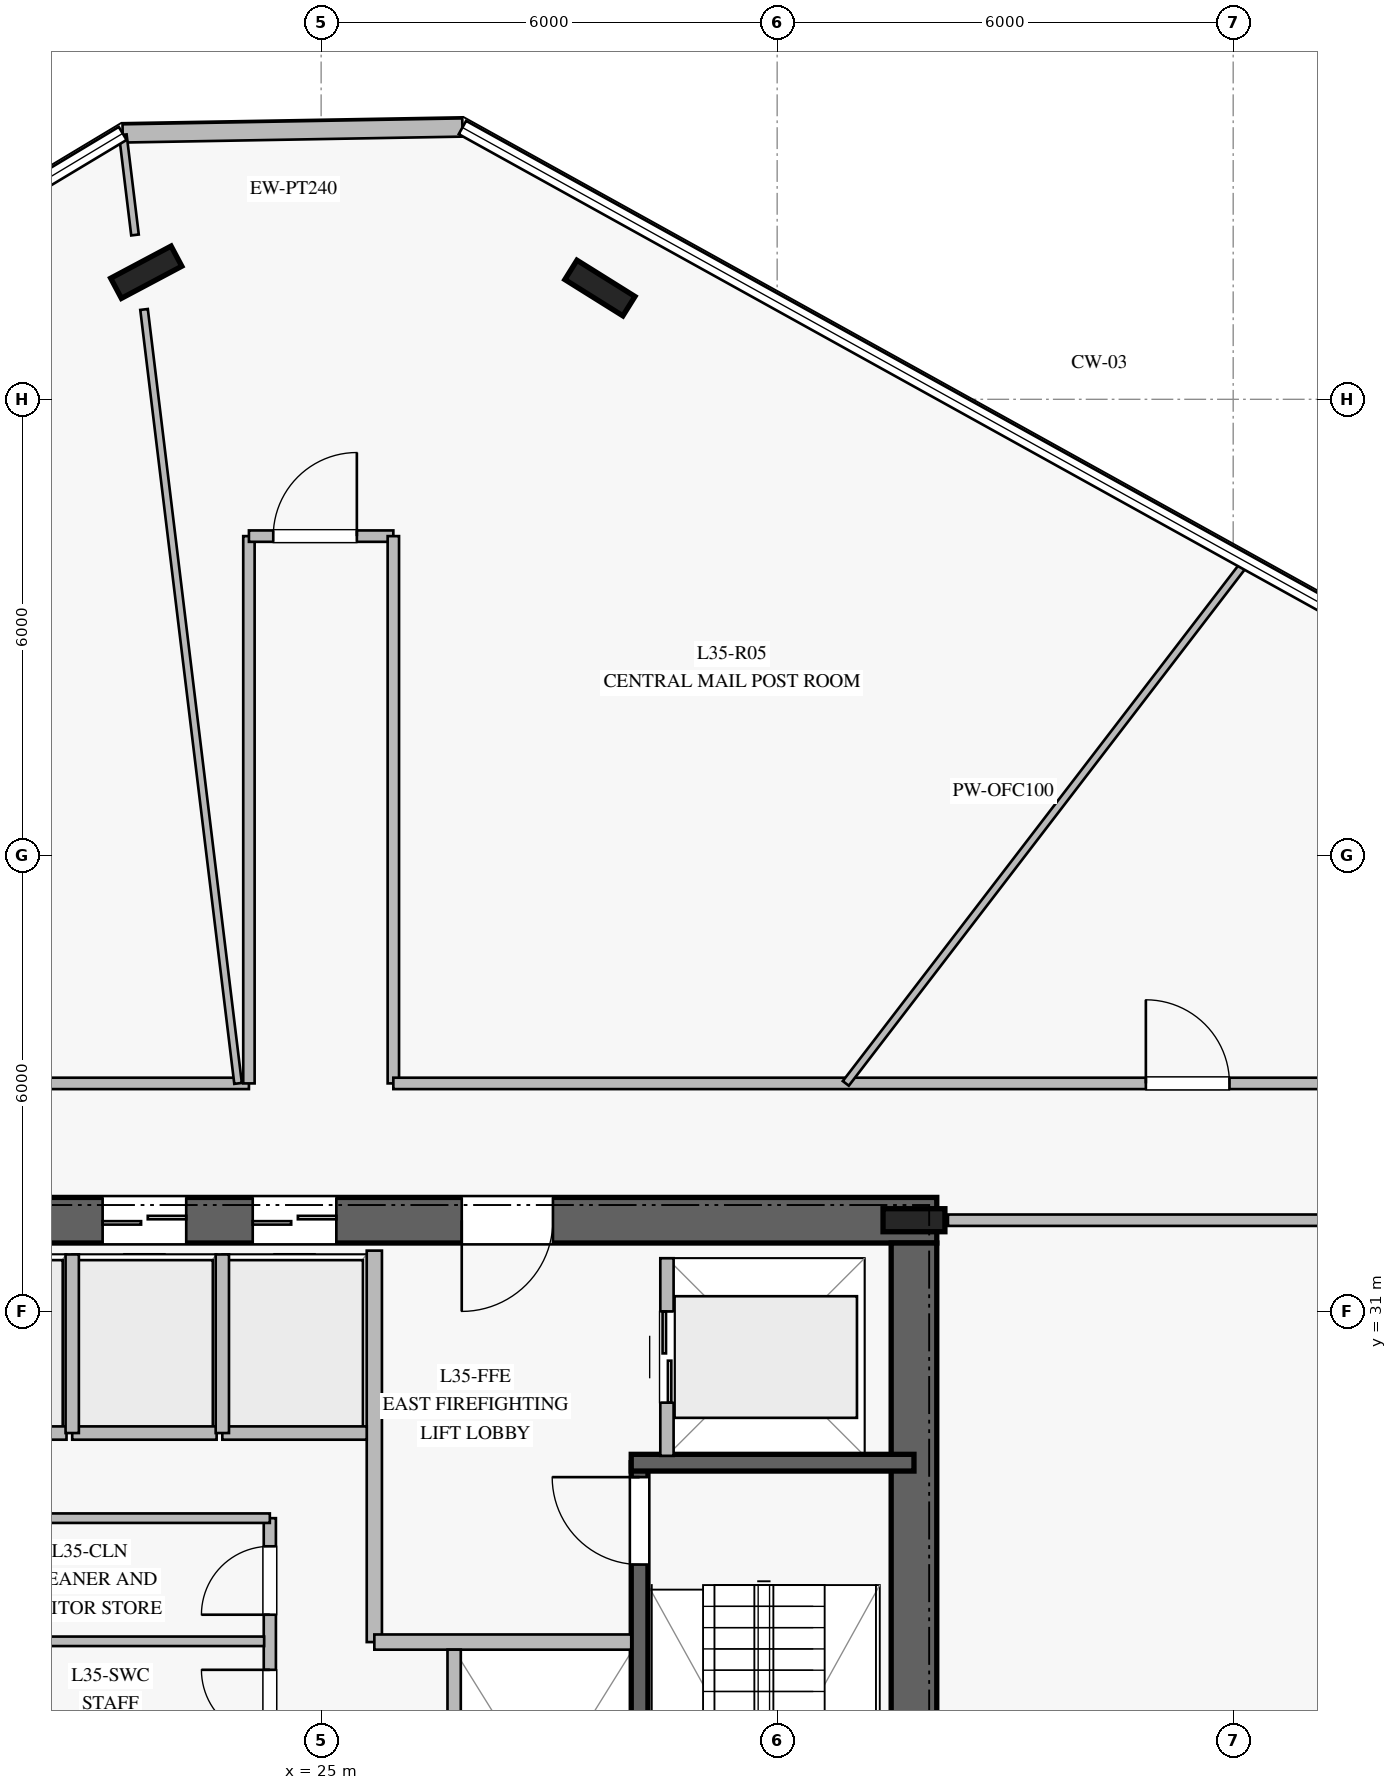
"""IFC4 building model, lengths in metres.
Left out: names, types, materials, properties, quantities, classifications, styles, units other than length and angle.
Written with IfcOpenShell. Run it as: python <this file> out.ifc"""

import sys

from ifc_helpers import new_model, si_unit, direction, frame, frame_2d, origin, origin_2d, place, context, subcontext, project, spatial, rectangle, i_section, extrude, element, fill, save


model = new_model("IFC4")
c1 = context("Model", 3, precision=1e-05, world=origin(), true_north=direction((0.0, 1.0)))
c2 = subcontext(c1, "Body", "Model", "MODEL_VIEW")
j1 = project(units=[si_unit("LENGTHUNIT", "METRE"), si_unit("PLANEANGLEUNIT", "RADIAN")], contexts=[c1])
p1 = place(None, origin())
s1 = spatial("IfcSite", under=j1, at=p1, CompositionType="ELEMENT")
p2 = place(p1, origin())
s2 = spatial("IfcBuilding", under=s1, at=p2, CompositionType="ELEMENT")
p3 = place(p2, frame((0.0, 0.0, 146.4)))
s3 = spatial("IfcBuildingStorey", under=s2, at=p3, CompositionType="ELEMENT", Elevation=146.4)
p4 = place(p3, frame((33.1, 32.2, 0.0), z_axis=(0.0, 0.0, 1.0), x_axis=(-1.0, 0.0, 0.0)))
e1 = element("IfcWall", 1, at=p4, inside=s3, PredefinedType="SHEAR", context=c2, shape_type="SweptSolid", body=[
    extrude(rectangle(XDim=16.2, YDim=0.6, at=frame_2d((8.1, 0.0))), origin(), (0.0, 0.0, 1.0), 3.76),
])
p5 = place(p4, frame((5.05, 0.0, 0.0)))
e2 = element("IfcOpeningElement", 2, at=p5, cuts=e1, PredefinedType="OPENING", context=c2, shape_type="SweptSolid", body=[
    extrude(rectangle(XDim=1.2, YDim=2.25, at=frame_2d((0.6, 1.125))), frame((0.0, 0.31, 0.0), z_axis=(0.0, -1.0, 0.0), x_axis=(1.0, 0.0, 0.0)), (0.0, 0.0, 1.0), 0.62),
])
p6 = place(p4, frame((11.85, 0.0, 0.0)))
e3 = element("IfcOpeningElement", 3, at=p6, cuts=e1, PredefinedType="OPENING", context=c2, shape_type="SweptSolid", body=[
    extrude(rectangle(XDim=1.1, YDim=2.2, at=frame_2d((0.55, 1.1))), frame((0.0, 0.31, 0.0), z_axis=(0.0, -1.0, 0.0), x_axis=(1.0, 0.0, 0.0)), (0.0, 0.0, 1.0), 0.62),
])
p7 = place(p4, frame((9.875, 0.0, 0.0)))
e4 = element("IfcOpeningElement", 4, at=p7, cuts=e1, PredefinedType="OPENING", context=c2, shape_type="SweptSolid", body=[
    extrude(rectangle(XDim=1.1, YDim=2.2, at=frame_2d((0.55, 1.1))), frame((0.0, 0.31, 0.0), z_axis=(0.0, -1.0, 0.0), x_axis=(1.0, 0.0, 0.0)), (0.0, 0.0, 1.0), 0.62),
])
p8 = place(p4, frame((7.9, 0.0, 0.0)))
e5 = element("IfcOpeningElement", 5, at=p8, cuts=e1, PredefinedType="OPENING", context=c2, shape_type="SweptSolid", body=[
    extrude(rectangle(XDim=1.1, YDim=2.2, at=frame_2d((0.55, 1.1))), frame((0.0, 0.31, 0.0), z_axis=(0.0, -1.0, 0.0), x_axis=(1.0, 0.0, 0.0)), (0.0, 0.0, 1.0), 0.62),
])
p9 = place(p3, frame((32.8, 18.1, 0.0), z_axis=(0.0, 0.0, 1.0), x_axis=(0.0, 1.0, 0.0)))
e6 = element("IfcWall", 6, at=p9, inside=s3, PredefinedType="SHEAR", context=c2, shape_type="SweptSolid", body=[
    extrude(rectangle(XDim=13.8, YDim=0.6, at=frame_2d((6.9, 0.0))), origin(), (0.0, 0.0, 1.0), 3.76),
])
p10 = place(p3, frame((32.8, 32.2, 0.0), z_axis=(0.0, 0.0, 1.0), x_axis=(1.0, 0.0, 0.0)))
e7 = element("IfcColumn", 7, at=p10, inside=s3, PredefinedType="COLUMN", context=c2, shape_type="SweptSolid", body=[
    extrude(i_section(OverallWidth=0.303, OverallDepth=0.814, WebThickness=0.021, FlangeThickness=0.04, at=origin_2d()), origin(), (0.0, 0.0, 1.0), 4.0),
])
p11 = place(p3, frame((29.19, 21.79, 0.0), z_axis=(0.0, 0.0, 1.0), x_axis=(0.0, 1.0, 0.0)))
e8 = element("IfcWall", 8, at=p11, inside=s3, PredefinedType="SOLIDWALL", context=c2, shape_type="SweptSolid", body=[
    extrude(rectangle(XDim=7.22, YDim=0.22, at=frame_2d((3.61, 0.0))), origin(), (0.0, 0.0, 1.0), 3.76),
])
p12 = place(p11, frame((5.88, 0.0, 0.0)))
e9 = element("IfcOpeningElement", 9, at=p12, cuts=e8, PredefinedType="OPENING", context=c2, shape_type="SweptSolid", body=[
    extrude(rectangle(XDim=1.15, YDim=2.2, at=frame_2d((0.575, 1.1))), frame((0.0, 0.12, 0.0), z_axis=(0.0, -1.0, 0.0), x_axis=(1.0, 0.0, 0.0)), (0.0, 0.0, 1.0), 0.24),
])
p13 = place(p3, frame((29.08, 29.01, 0.0), z_axis=(0.0, 0.0, 1.0), x_axis=(1.0, 0.0, 0.0)))
e10 = element("IfcWall", 10, at=p13, inside=s3, PredefinedType="SOLIDWALL", context=c2, shape_type="SweptSolid", body=[
    extrude(rectangle(XDim=3.72, YDim=0.22, at=frame_2d((1.86, 0.0))), origin(), (0.0, 0.0, 1.0), 3.76),
])
for number, where, z_axis, x_axis in (
    (11, (28.668, 44.464, 0.0), (0.0, 0.0, 1.0), (-0.848, 0.53, 0.0)),
    (12, (22.699, 44.672, 0.0), (0.0, 0.0, 1.0), (0.883, 0.469, 0.0)),
):
    element("IfcColumn", number, at=place(p3, frame(where, z_axis=z_axis, x_axis=x_axis)), inside=s3, PredefinedType="COLUMN", context=c2, shape_type="SweptSolid", body=[
        extrude(i_section(OverallWidth=0.3, OverallDepth=0.9, WebThickness=0.019, FlangeThickness=0.035, at=origin_2d()), origin(), (0.0, 0.0, 1.0), 4.0),
    ])
p14 = place(p3, frame((26.859, 46.576, 0.0), z_axis=(0.0, 0.0, 1.0), x_axis=(-0.999848251902, -0.017420481313, 0.0)))
e13 = element("IfcWall", 13, at=p14, inside=s3, PredefinedType="STANDARD", context=c2, shape_type="SweptSolid", body=[
    extrude(rectangle(XDim=4.471, YDim=0.24, at=frame_2d((2.235, 0.0))), origin(), (0.0, 0.0, 1.0), 3.76),
])
p15 = place(p3, frame((25.7, 26.65, 0.0), z_axis=(0.0, 0.0, 1.0), x_axis=(0.0, 1.0, 0.0)))
e14 = element("IfcWall", 14, at=p15, inside=s3, PredefinedType="PARTITIONING", context=c2, shape_type="SweptSolid", body=[
    extrude(rectangle(XDim=5.15, YDim=0.2, at=frame_2d((2.575, 0.0))), origin(), (0.0, 0.0, 1.0), 3.76),
])
p16 = place(p3, frame((25.7, 26.65, 0.0), z_axis=(0.0, 0.0, 1.0), x_axis=(1.0, 0.0, 0.0)))
e15 = element("IfcWall", 15, at=p16, inside=s3, PredefinedType="PARTITIONING", context=c2, shape_type="SweptSolid", body=[
    extrude(rectangle(XDim=3.38, YDim=0.2, at=frame_2d((1.69, 0.0))), origin(), (0.0, 0.0, 1.0), 3.76),
])
p17 = place(p3, frame((24.325, 23.35, 0.0), z_axis=(0.0, 0.0, 1.0), x_axis=(0.0, 1.0, 0.0)))
e16 = element("IfcWall", 16, at=p17, inside=s3, PredefinedType="PLUMBINGWALL", context=c2, shape_type="SweptSolid", body=[
    extrude(rectangle(XDim=4.93, YDim=0.16, at=frame_2d((2.465, 0.0))), origin(), (0.0, 0.0, 1.0), 3.76),
])
p18 = place(p17, frame((0.375, 0.0, 0.0)))
e17 = element("IfcOpeningElement", 17, at=p18, cuts=e16, PredefinedType="OPENING", context=c2, shape_type="SweptSolid", body=[
    extrude(rectangle(XDim=0.95, YDim=2.1, at=frame_2d((0.475, 1.05))), frame((0.0, 0.09, 0.0), z_axis=(0.0, -1.0, 0.0), x_axis=(1.0, 0.0, 0.0)), (0.0, 0.0, 1.0), 0.18),
])
p19 = place(p17, frame((2.035, 0.0, 0.0)))
e18 = element("IfcOpeningElement", 18, at=p19, cuts=e16, PredefinedType="OPENING", context=c2, shape_type="SweptSolid", body=[
    extrude(rectangle(XDim=0.9, YDim=2.1, at=frame_2d((0.45, 1.05))), frame((0.0, 0.09, 0.0), z_axis=(0.0, -1.0, 0.0), x_axis=(1.0, 0.0, 0.0)), (0.0, 0.0, 1.0), 0.18),
])
p20 = place(p17, frame((3.66, 0.0, 0.0)))
e19 = element("IfcOpeningElement", 19, at=p20, cuts=e16, PredefinedType="OPENING", context=c2, shape_type="SweptSolid", body=[
    extrude(rectangle(XDim=0.9, YDim=2.1, at=frame_2d((0.45, 1.05))), frame((0.0, 0.09, 0.0), z_axis=(0.0, -1.0, 0.0), x_axis=(1.0, 0.0, 0.0)), (0.0, 0.0, 1.0), 0.18),
])
p21 = place(p3, frame((20.92, 28.28, 0.0), z_axis=(0.0, 0.0, 1.0), x_axis=(1.0, 0.0, 0.0)))
e20 = element("IfcWall", 20, at=p21, inside=s3, PredefinedType="PARTITIONING", context=c2, shape_type="SweptSolid", body=[
    extrude(rectangle(XDim=3.405, YDim=0.125, at=frame_2d((1.703, 0.0))), origin(), (0.0, 0.0, 1.0), 3.76),
])
p22 = place(p3, frame((20.95, 26.66, 0.0), z_axis=(0.0, 0.0, 1.0), x_axis=(1.0, 0.0, 0.0)))
e21 = element("IfcWall", 21, at=p22, inside=s3, PredefinedType="PARTITIONING", context=c2, shape_type="SweptSolid", body=[
    extrude(rectangle(XDim=3.3, YDim=0.125, at=frame_2d((1.65, 0.0))), origin(), (0.0, 0.0, 1.0), 3.76),
])
for number, where, z_axis, x_axis in (
    (22, (19.75, 29.4, 0.0), (0.0, 0.0, 1.0), (1.0, 0.0, 0.0)),
    (23, (21.725, 29.4, 0.0), (0.0, 0.0, 1.0), (1.0, 0.0, 0.0)),
):
    element("IfcWall", number, at=place(p3, frame(where, z_axis=z_axis, x_axis=x_axis)), inside=s3, PredefinedType="PARTITIONING", context=c2, shape_type="SweptSolid", body=[
        extrude(rectangle(XDim=1.9, YDim=0.175, at=frame_2d((0.95, 0.0))), origin(), (0.0, 0.0, 1.0), 3.76),
    ])
p23 = place(p3, frame((21.725, 29.4, 0.0), z_axis=(0.0, 0.0, 1.0), x_axis=(0.0, 1.0, 0.0)))
e24 = element("IfcWall", 24, at=p23, inside=s3, PredefinedType="PARTITIONING", context=c2, shape_type="SweptSolid", body=[
    extrude(rectangle(XDim=2.35, YDim=0.175, at=frame_2d((1.175, 0.0))), origin(), (0.0, 0.0, 1.0), 3.76),
])
p24 = place(p3, frame((23.7, 29.4, 0.0), z_axis=(0.0, 0.0, 1.0), x_axis=(1.0, 0.0, 0.0)))
e25 = element("IfcWall", 25, at=p24, inside=s3, PredefinedType="PARTITIONING", context=c2, shape_type="SweptSolid", body=[
    extrude(rectangle(XDim=1.9, YDim=0.175, at=frame_2d((0.95, 0.0))), origin(), (0.0, 0.0, 1.0), 3.76),
])
p25 = place(p3, frame((23.7, 29.4, 0.0), z_axis=(0.0, 0.0, 1.0), x_axis=(0.0, 1.0, 0.0)))
e26 = element("IfcWall", 26, at=p25, inside=s3, PredefinedType="PARTITIONING", context=c2, shape_type="SweptSolid", body=[
    extrude(rectangle(XDim=2.35, YDim=0.175, at=frame_2d((1.175, 0.0))), origin(), (0.0, 0.0, 1.0), 3.76),
])
p26 = place(p3, frame((26.75, 24.65, 0.0), z_axis=(0.0, 0.0, 1.0), x_axis=(0.0, 1.0, 0.0)))
e27 = element("IfcWall", 27, at=p26, inside=s3, PredefinedType="PARTITIONING", context=c2, shape_type="SweptSolid", body=[
    extrude(rectangle(XDim=1.9, YDim=0.175, at=frame_2d((0.95, 0.0))), origin(), (0.0, 0.0, 1.0), 3.76),
])
p27 = place(p3, frame((29.55, 29.1, 0.0), z_axis=(0.0, 0.0, 1.0), x_axis=(0.0, 1.0, 0.0)))
e28 = element("IfcWall", 28, at=p27, inside=s3, PredefinedType="PARTITIONING", context=c2, shape_type="SweptSolid", body=[
    extrude(rectangle(XDim=2.6, YDim=0.175, at=frame_2d((1.3, 0.0))), origin(), (0.0, 0.0, 1.0), 3.76),
])
p28 = place(p27, frame((0.7, 0.0, 0.0)))
e29 = element("IfcOpeningElement", 29, at=p28, cuts=e28, PredefinedType="OPENING", context=c2, shape_type="SweptSolid", body=[
    extrude(rectangle(XDim=1.2, YDim=2.2, at=frame_2d((0.6, 1.1))), frame((0.0, 0.098, 0.0), z_axis=(0.0, -1.0, 0.0), x_axis=(1.0, 0.0, 0.0)), (0.0, 0.0, 1.0), 0.195),
])
p29 = place(p3, frame((17.2, 34.0, 0.0), z_axis=(0.0, 0.0, 1.0), x_axis=(1.0, 0.0, 0.0)))
e30 = element("IfcWall", 30, at=p29, inside=s3, PredefinedType="PARTITIONING", context=c2, shape_type="SweptSolid", body=[
    extrude(rectangle(XDim=6.85, YDim=0.15, at=frame_2d((3.425, 0.0))), origin(), (0.0, 0.0, 1.0), 3.21),
])
p30 = place(p3, frame((24.05, 34.0, 0.0), z_axis=(0.0, 0.0, 1.0), x_axis=(0.0, 1.0, 0.0)))
e31 = element("IfcWall", 31, at=p30, inside=s3, PredefinedType="PARTITIONING", context=c2, shape_type="SweptSolid", body=[
    extrude(rectangle(XDim=7.2, YDim=0.15, at=frame_2d((3.6, 0.0))), origin(), (0.0, 0.0, 1.0), 3.36),
])
p31 = place(p3, frame((24.05, 41.2, 0.0), z_axis=(0.0, 0.0, 1.0), x_axis=(1.0, 0.0, 0.0)))
e32 = element("IfcWall", 32, at=p31, inside=s3, PredefinedType="PARTITIONING", context=c2, shape_type="SweptSolid", body=[
    extrude(rectangle(XDim=1.9, YDim=0.15, at=frame_2d((0.95, 0.0))), origin(), (0.0, 0.0, 1.0), 3.76),
])
p32 = place(p31, frame((0.32, 0.0, 0.0)))
e33 = element("IfcOpeningElement", 33, at=p32, cuts=e32, PredefinedType="OPENING", context=c2, shape_type="SweptSolid", body=[
    extrude(rectangle(XDim=1.1, YDim=2.2, at=frame_2d((0.55, 1.1))), frame((0.0, 0.085, 0.0), z_axis=(0.0, -1.0, 0.0), x_axis=(1.0, 0.0, 0.0)), (0.0, 0.0, 1.0), 0.17),
])
p33 = place(p3, frame((25.95, 41.2, 0.0), z_axis=(0.0, 0.0, 1.0), x_axis=(0.0, -1.0, 0.0)))
e34 = element("IfcWall", 34, at=p33, inside=s3, PredefinedType="PARTITIONING", context=c2, shape_type="SweptSolid", body=[
    extrude(rectangle(XDim=7.2, YDim=0.15, at=frame_2d((3.6, 0.0))), origin(), (0.0, 0.0, 1.0), 3.36),
])
p34 = place(p3, frame((25.95, 34.0, 0.0), z_axis=(0.0, 0.0, 1.0), x_axis=(1.0, 0.0, 0.0)))
e35 = element("IfcWall", 35, at=p34, inside=s3, PredefinedType="PARTITIONING", context=c2, shape_type="SweptSolid", body=[
    extrude(rectangle(XDim=15.25, YDim=0.15, at=frame_2d((7.625, 0.0))), origin(), (0.0, 0.0, 1.0), 3.21),
])
p35 = place(p34, frame((9.901, 0.0, 0.0)))
e36 = element("IfcOpeningElement", 36, at=p35, cuts=e35, PredefinedType="OPENING", context=c2, shape_type="SweptSolid", body=[
    extrude(rectangle(XDim=1.1, YDim=2.2, at=frame_2d((0.55, 1.1))), frame((0.0, 0.085, 0.0), z_axis=(0.0, -1.0, 0.0), x_axis=(1.0, 0.0, 0.0)), (0.0, 0.0, 1.0), 0.17),
])
p36 = place(p3, frame((41.2, 32.2, 0.0), z_axis=(0.0, 0.0, 1.0), x_axis=(-1.0, 0.0, 0.0)))
e37 = element("IfcWall", 37, at=p36, inside=s3, PredefinedType="PARTITIONING", context=c2, shape_type="SweptSolid", body=[
    extrude(rectangle(XDim=7.953, YDim=0.15, at=frame_2d((3.977, 0.0))), origin(), (0.0, 0.0, 1.0), 3.21),
])
p37 = place(p3, frame((31.903, 34.0, 0.0), z_axis=(0.0, 0.0, 1.0), x_axis=(0.608641157294, 0.793445613541, 0.0)))
e38 = element("IfcWall", 38, at=p37, inside=s3, PredefinedType="MOVABLE", context=c2, shape_type="SweptSolid", body=[
    extrude(rectangle(XDim=8.631, YDim=0.1, at=frame_2d((4.315, 0.0))), origin(), (0.0, 0.0, 1.0), 3.02),
])
p38 = place(p3, frame((23.907, 34.0, 0.0), z_axis=(0.0, 0.0, 1.0), x_axis=(-0.120609307466, 0.992700052862, 0.0)))
e39 = element("IfcWall", 39, at=p38, inside=s3, PredefinedType="MOVABLE", context=c2, shape_type="SweptSolid", body=[
    extrude(rectangle(XDim=10.257, YDim=0.1, at=frame_2d((5.128, 0.0))), origin(), (0.0, 0.0, 1.0), 3.21),
])
p39 = place(p3, frame((22.551, 45.162, 0.0), z_axis=(0.0, 0.0, 1.0), x_axis=(-0.120545716325, 0.992707776879, 0.0)))
e40 = element("IfcWall", 40, at=p39, inside=s3, PredefinedType="MOVABLE", context=c2, shape_type="SweptSolid", body=[
    extrude(rectangle(XDim=1.327, YDim=0.1, at=frame_2d((0.663, 0.0))), origin(), (0.0, 0.0, 1.0), 3.76),
])
p40 = place(p12, origin())
e41 = element("IfcDoor", 41, at=p40, inside=s3, OperationType="SINGLE_SWING_RIGHT", PredefinedType="DOOR", context=c2, shape_type="SweptSolid", body=[
    extrude(rectangle(XDim=1.15, YDim=2.2, at=frame_2d((0.575, 1.1))), frame((0.0, 0.025, 0.0), z_axis=(0.0, -1.0, 0.0), x_axis=(1.0, 0.0, 0.0)), (0.0, 0.0, 1.0), 0.05),
])
fill(e9, e41)
p41 = place(p5, origin())
e42 = element("IfcDoor", 42, at=p41, inside=s3, OperationType="SINGLE_SWING_RIGHT", PredefinedType="DOOR", context=c2, shape_type="SweptSolid", body=[
    extrude(rectangle(XDim=1.2, YDim=2.25, at=frame_2d((0.6, 1.125))), frame((0.0, 0.025, 0.0), z_axis=(0.0, -1.0, 0.0), x_axis=(1.0, 0.0, 0.0)), (0.0, 0.0, 1.0), 0.05),
])
fill(e2, e42)
p42 = place(p19, origin())
e43 = element("IfcDoor", 43, at=p42, inside=s3, OperationType="SINGLE_SWING_RIGHT", PredefinedType="DOOR", context=c2, shape_type="SweptSolid", body=[
    extrude(rectangle(XDim=0.9, YDim=2.1, at=frame_2d((0.45, 1.05))), frame((0.0, 0.025, 0.0), z_axis=(0.0, -1.0, 0.0), x_axis=(1.0, 0.0, 0.0)), (0.0, 0.0, 1.0), 0.05),
])
fill(e18, e43)
p43 = place(p20, origin())
e44 = element("IfcDoor", 44, at=p43, inside=s3, OperationType="SINGLE_SWING_LEFT", PredefinedType="DOOR", context=c2, shape_type="SweptSolid", body=[
    extrude(rectangle(XDim=0.9, YDim=2.1, at=frame_2d((0.45, 1.05))), frame((0.0, 0.025, 0.0), z_axis=(0.0, -1.0, 0.0), x_axis=(1.0, 0.0, 0.0)), (0.0, 0.0, 1.0), 0.05),
])
fill(e19, e44)
p44 = place(p7, origin())
e45 = element("IfcDoor", 45, at=p44, inside=s3, OperationType="DOUBLE_DOOR_SLIDING", PredefinedType="DOOR", context=c2, shape_type="SweptSolid", body=[
    extrude(rectangle(XDim=1.1, YDim=2.2, at=frame_2d((0.55, 1.1))), frame((0.0, 0.025, 0.0), z_axis=(0.0, -1.0, 0.0), x_axis=(1.0, 0.0, 0.0)), (0.0, 0.0, 1.0), 0.05),
])
fill(e4, e45)
p45 = place(p8, origin())
e46 = element("IfcDoor", 46, at=p45, inside=s3, OperationType="DOUBLE_DOOR_SLIDING", PredefinedType="DOOR", context=c2, shape_type="SweptSolid", body=[
    extrude(rectangle(XDim=1.1, YDim=2.2, at=frame_2d((0.55, 1.1))), frame((0.0, 0.025, 0.0), z_axis=(0.0, -1.0, 0.0), x_axis=(1.0, 0.0, 0.0)), (0.0, 0.0, 1.0), 0.05),
])
fill(e5, e46)
p46 = place(p28, origin())
e47 = element("IfcDoor", 47, at=p46, inside=s3, OperationType="DOUBLE_DOOR_SLIDING", PredefinedType="DOOR", context=c2, shape_type="SweptSolid", body=[
    extrude(rectangle(XDim=1.2, YDim=2.2, at=frame_2d((0.6, 1.1))), frame((0.0, 0.025, 0.0), z_axis=(0.0, -1.0, 0.0), x_axis=(1.0, 0.0, 0.0)), (0.0, 0.0, 1.0), 0.05),
])
fill(e29, e47)
p47 = place(p35, origin())
e48 = element("IfcDoor", 48, at=p47, inside=s3, OperationType="SINGLE_SWING_LEFT", PredefinedType="DOOR", context=c2, shape_type="SweptSolid", body=[
    extrude(rectangle(XDim=1.1, YDim=2.2, at=frame_2d((0.55, 1.1))), frame((0.0, 0.025, 0.0), z_axis=(0.0, -1.0, 0.0), x_axis=(1.0, 0.0, 0.0)), (0.0, 0.0, 1.0), 0.05),
])
fill(e36, e48)
p48 = place(p32, origin())
e49 = element("IfcDoor", 49, at=p48, inside=s3, OperationType="SINGLE_SWING_RIGHT", PredefinedType="DOOR", context=c2, shape_type="SweptSolid", body=[
    extrude(rectangle(XDim=1.1, YDim=2.2, at=frame_2d((0.55, 1.1))), frame((0.0, 0.025, 0.0), z_axis=(0.0, -1.0, 0.0), x_axis=(1.0, 0.0, 0.0)), (0.0, 0.0, 1.0), 0.05),
])
fill(e33, e49)
save(model, sys.argv[1])
